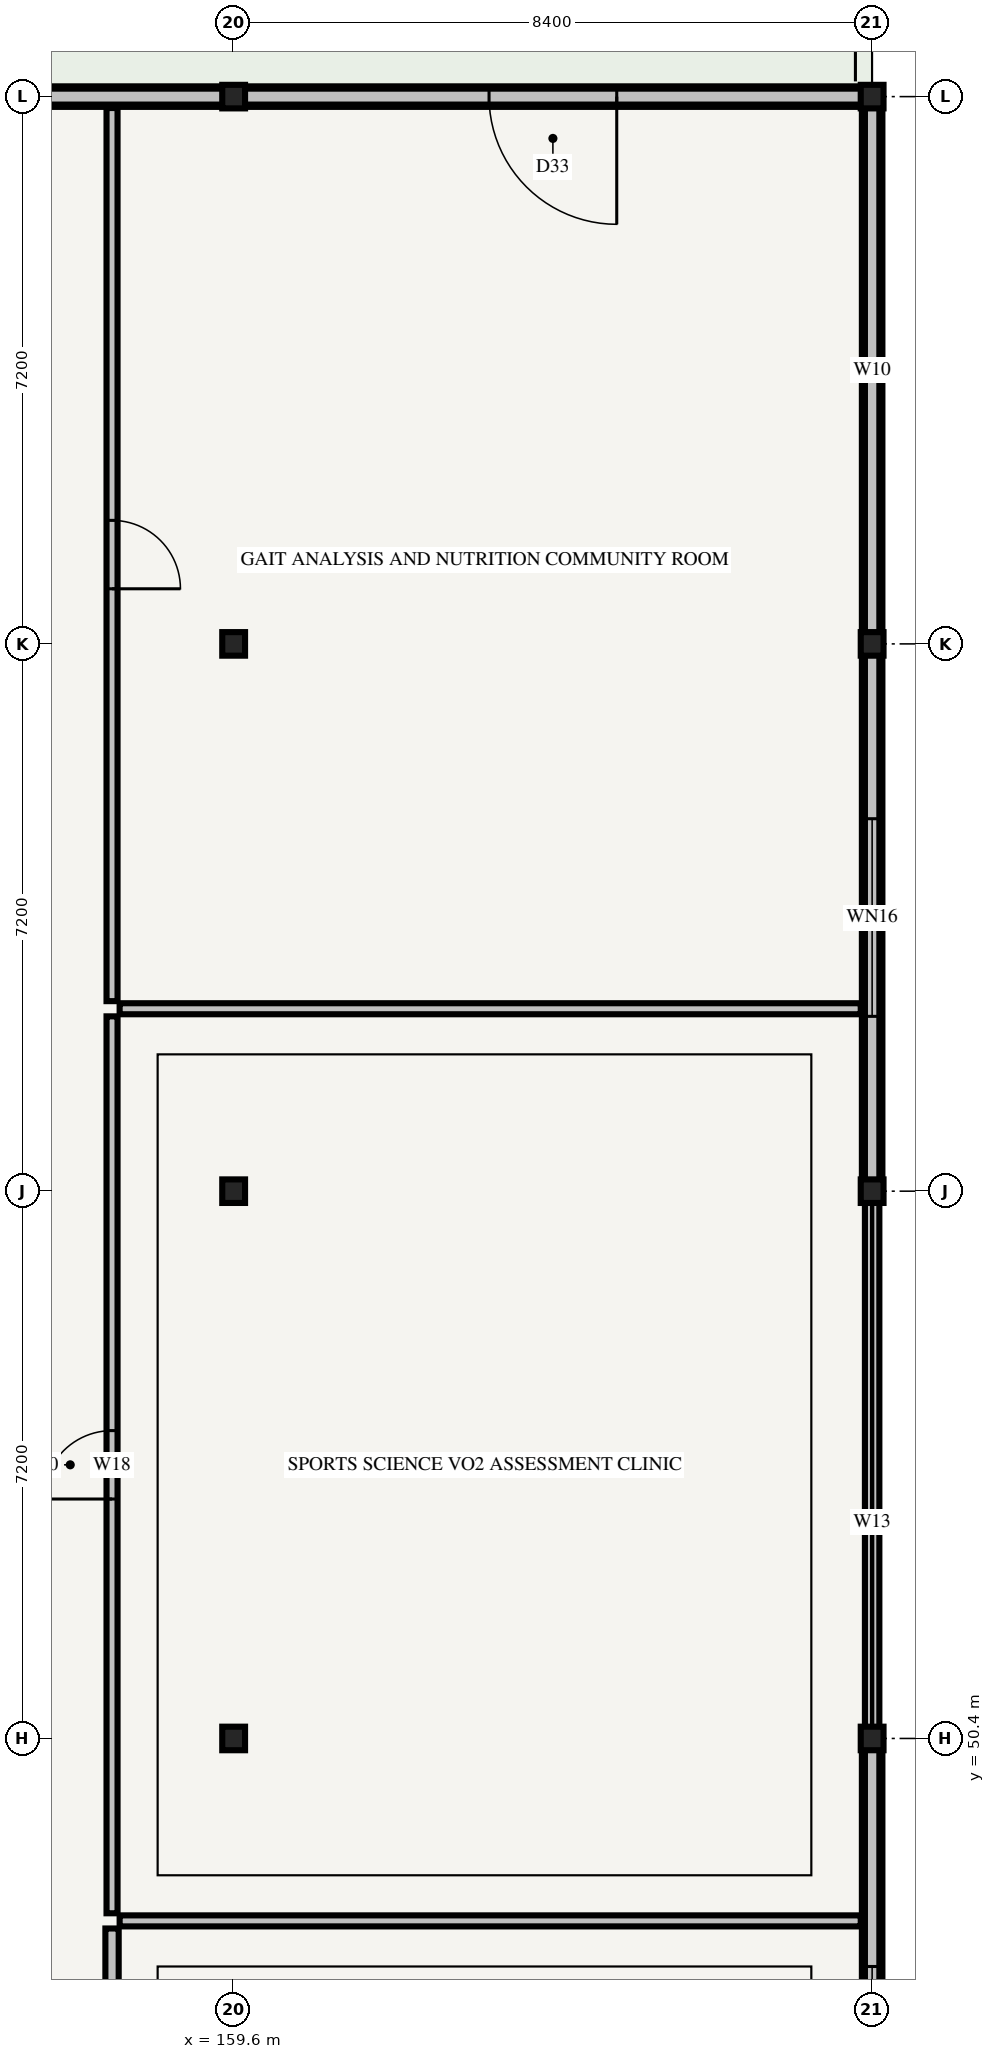
"""IFC4 building model, lengths in metres.
Left out: names, types, materials, properties, quantities, classifications, styles, units other than length and angle.
Written with IfcOpenShell. Run it as: python <this file> out.ifc"""

import sys

from ifc_helpers import new_model, si_unit, direction, frame, frame_2d, origin, origin_2d, place, context, subcontext, project, spatial, rectangle, i_section, extrude, element, fill, save


model = new_model("IFC4")
c1 = context("Model", 3, precision=1e-05, world=origin(), true_north=direction((0.0, 1.0)))
c2 = subcontext(c1, "Body", "Model", "MODEL_VIEW")
j1 = project(units=[si_unit("LENGTHUNIT", "METRE"), si_unit("PLANEANGLEUNIT", "RADIAN")], contexts=[c1])
p1 = place(None, origin())
s1 = spatial("IfcSite", under=j1, at=p1, CompositionType="ELEMENT")
p2 = place(p1, origin())
s2 = spatial("IfcBuilding", under=s1, at=p2, CompositionType="ELEMENT")
p3 = place(p2, frame((0.0, 0.0, 17.1)))
s3 = spatial("IfcBuildingStorey", under=s2, at=p3, CompositionType="ELEMENT", Elevation=17.1)
for number, where, z_axis, x_axis in (
    (1, (159.6, 50.4, 0.0), (0.0, 0.0, 1.0), (1.0, 0.0, 0.0)),
    (2, (159.6, 57.6, 0.0), (0.0, 0.0, 1.0), (1.0, 0.0, 0.0)),
    (3, (159.6, 64.8, 0.0), (0.0, 0.0, 1.0), (1.0, 0.0, 0.0)),
    (4, (159.6, 72.0, 0.0), (0.0, 0.0, 1.0), (1.0, 0.0, 0.0)),
    (5, (168.0, 50.4, 0.0), (0.0, 0.0, 1.0), (1.0, 0.0, 0.0)),
    (6, (168.0, 57.6, 0.0), (0.0, 0.0, 1.0), (1.0, 0.0, 0.0)),
    (7, (168.0, 64.8, 0.0), (0.0, 0.0, 1.0), (1.0, 0.0, 0.0)),
    (8, (168.0, 72.0, 0.0), (0.0, 0.0, 1.0), (1.0, 0.0, 0.0)),
):
    element("IfcColumn", number, at=place(p3, frame(where, z_axis=z_axis, x_axis=x_axis)), inside=s3, PredefinedType="COLUMN", context=c2, shape_type="SweptSolid", body=[
        extrude(i_section(OverallWidth=0.3, OverallDepth=0.31, WebThickness=0.009, FlangeThickness=0.015, FilletRadius=0.027, at=origin_2d()), origin(), (0.0, 0.0, 1.0), 4.2),
    ])
p4 = place(p3, frame((168.0, 43.2, 0.0), z_axis=(0.0, 0.0, 1.0), x_axis=(0.0, 1.0, 0.0)))
e9 = element("IfcWall", 9, at=p4, inside=s3, PredefinedType="STANDARD", context=c2, shape_type="SweptSolid", body=[
    extrude(rectangle(XDim=7.2, YDim=0.27, at=frame_2d((3.6, 0.0))), origin(), (0.0, 0.0, 1.0), 3.495),
])
p5 = place(p4, frame((3.0, 0.0, 0.85)))
e10 = element("IfcOpeningElement", 10, at=p5, cuts=e9, PredefinedType="OPENING", context=c2, shape_type="SweptSolid", body=[
    extrude(rectangle(XDim=1.2, YDim=1.8, at=frame_2d((0.6, 0.9))), frame((0.0, 0.16, 0.0), z_axis=(0.0, -1.0, 0.0), x_axis=(1.0, 0.0, 0.0)), (0.0, 0.0, 1.0), 0.32),
])
p6 = place(p3, frame((168.0, 57.6, 0.0), z_axis=(0.0, 0.0, 1.0), x_axis=(0.0, 1.0, 0.0)))
e11 = element("IfcWall", 11, at=p6, inside=s3, PredefinedType="STANDARD", context=c2, shape_type="SweptSolid", body=[
    extrude(rectangle(XDim=7.2, YDim=0.27, at=frame_2d((3.6, 0.0))), origin(), (0.0, 0.0, 1.0), 3.395),
])
p7 = place(p6, frame((2.3, 0.0, 0.85)))
e12 = element("IfcOpeningElement", 12, at=p7, cuts=e11, PredefinedType="OPENING", context=c2, shape_type="SweptSolid", body=[
    extrude(rectangle(XDim=2.6, YDim=2.0, at=frame_2d((1.3, 1.0))), frame((0.0, 0.16, 0.0), z_axis=(0.0, -1.0, 0.0), x_axis=(1.0, 0.0, 0.0)), (0.0, 0.0, 1.0), 0.32),
])
p8 = place(p3, frame((168.0, 64.8, 0.0), z_axis=(0.0, 0.0, 1.0), x_axis=(0.0, 1.0, 0.0)))
e13 = element("IfcWall", 13, at=p8, inside=s3, PredefinedType="STANDARD", context=c2, shape_type="SweptSolid", body=[
    extrude(rectangle(XDim=7.2, YDim=0.27, at=frame_2d((3.6, 0.0))), origin(), (0.0, 0.0, 1.0), 3.445),
])
p9 = place(p3, frame((168.0, 72.0, 0.0), z_axis=(0.0, 0.0, 1.0), x_axis=(-1.0, 0.0, 0.0)))
e14 = element("IfcWall", 14, at=p9, inside=s3, PredefinedType="STANDARD", context=c2, shape_type="SweptSolid", body=[
    extrude(rectangle(XDim=8.4, YDim=0.27, at=frame_2d((4.2, 0.0))), origin(), (0.0, 0.0, 1.0), 3.545),
])
p10 = place(p9, frame((3.36, 0.0, 0.0)))
e15 = element("IfcOpeningElement", 15, at=p10, cuts=e14, PredefinedType="OPENING", context=c2, shape_type="SweptSolid", body=[
    extrude(rectangle(XDim=1.68, YDim=2.3, at=frame_2d((0.84, 1.15))), frame((0.0, 0.16, 0.0), z_axis=(0.0, -1.0, 0.0), x_axis=(1.0, 0.0, 0.0)), (0.0, 0.0, 1.0), 0.32),
])
p11 = place(p3, frame((159.6, 72.0, 0.0), z_axis=(0.0, 0.0, 1.0), x_axis=(-1.0, 0.0, 0.0)))
e16 = element("IfcWall", 16, at=p11, inside=s3, PredefinedType="STANDARD", context=c2, shape_type="SweptSolid", body=[
    extrude(rectangle(XDim=8.4, YDim=0.27, at=frame_2d((4.2, 0.0))), origin(), (0.0, 0.0, 1.0), 3.495),
])
p12 = place(p11, frame((3.51, 0.0, 0.0)))
e17 = element("IfcOpeningElement", 17, at=p12, cuts=e16, PredefinedType="OPENING", context=c2, shape_type="SweptSolid", body=[
    extrude(rectangle(XDim=1.38, YDim=2.25, at=frame_2d((0.69, 1.125))), frame((0.0, 0.16, 0.0), z_axis=(0.0, -1.0, 0.0), x_axis=(1.0, 0.0, 0.0)), (0.0, 0.0, 1.0), 0.32),
])
p13 = place(p3, frame((168.0, 28.8, 4.2), z_axis=(0.0, 0.0, 1.0), x_axis=(0.0, 1.0, 0.0)))
e18 = element("IfcWall", 18, at=p13, inside=s3, PredefinedType="PARAPET", context=c2, shape_type="SweptSolid", body=[
    extrude(rectangle(XDim=43.2, YDim=0.19, at=frame_2d((21.6, 0.0))), origin(), (0.0, 0.0, 1.0), 0.65),
])
p14 = place(p3, frame((168.0, 72.0, 4.2), z_axis=(0.0, 0.0, 1.0), x_axis=(-1.0, 0.0, 0.0)))
e19 = element("IfcWall", 19, at=p14, inside=s3, PredefinedType="PARAPET", context=c2, shape_type="SweptSolid", body=[
    extrude(rectangle(XDim=25.2, YDim=0.21, at=frame_2d((12.6, 0.0))), origin(), (0.0, 0.0, 1.0), 0.65),
])
p15 = place(p3, frame((158.0, 28.95, 0.0), z_axis=(0.0, 0.0, 1.0), x_axis=(0.0, 1.0, 0.0)))
e20 = element("IfcWall", 20, at=p15, inside=s3, PredefinedType="PARTITIONING", context=c2, shape_type="SweptSolid", body=[
    extrude(rectangle(XDim=18.95, YDim=0.175, at=frame_2d((9.475, 0.0))), origin(), (0.0, 0.0, 1.0), 3.32),
])
p16 = place(p15, frame((8.725, 0.0, 0.0)))
e21 = element("IfcOpeningElement", 21, at=p16, cuts=e20, PredefinedType="OPENING", context=c2, shape_type="SweptSolid", body=[
    extrude(rectangle(XDim=1.5, YDim=2.2, at=frame_2d((0.75, 1.1))), frame((0.0, 0.112, 0.0), z_axis=(0.0, -1.0, 0.0), x_axis=(1.0, 0.0, 0.0)), (0.0, 0.0, 1.0), 0.225),
])
p17 = place(p3, frame((158.0, 48.1, 0.0), z_axis=(0.0, 0.0, 1.0), x_axis=(0.0, 1.0, 0.0)))
e22 = element("IfcWall", 22, at=p17, inside=s3, PredefinedType="PARTITIONING", context=c2, shape_type="SweptSolid", body=[
    extrude(rectangle(XDim=11.8, YDim=0.145, at=frame_2d((5.9, 0.0))), origin(), (0.0, 0.0, 1.0), 3.32),
])
p18 = place(p17, frame((5.45, 0.0, 0.0)))
e23 = element("IfcOpeningElement", 23, at=p18, cuts=e22, PredefinedType="OPENING", context=c2, shape_type="SweptSolid", body=[
    extrude(rectangle(XDim=0.9, YDim=2.1, at=frame_2d((0.45, 1.05))), frame((0.0, 0.097, 0.0), z_axis=(0.0, -1.0, 0.0), x_axis=(1.0, 0.0, 0.0)), (0.0, 0.0, 1.0), 0.195),
])
p19 = place(p3, frame((158.0, 60.1, 0.0), z_axis=(0.0, 0.0, 1.0), x_axis=(0.0, 1.0, 0.0)))
e24 = element("IfcWall", 24, at=p19, inside=s3, PredefinedType="PARTITIONING", context=c2, shape_type="SweptSolid", body=[
    extrude(rectangle(XDim=11.75, YDim=0.145, at=frame_2d((5.875, 0.0))), origin(), (0.0, 0.0, 1.0), 3.32),
])
p20 = place(p19, frame((5.425, 0.0, 0.0)))
e25 = element("IfcOpeningElement", 25, at=p20, cuts=e24, PredefinedType="OPENING", context=c2, shape_type="SweptSolid", body=[
    extrude(rectangle(XDim=0.9, YDim=2.1, at=frame_2d((0.45, 1.05))), frame((0.0, 0.097, 0.0), z_axis=(0.0, -1.0, 0.0), x_axis=(1.0, 0.0, 0.0)), (0.0, 0.0, 1.0), 0.195),
])
for number, where, z_axis, x_axis in (
    (26, (158.1, 48.0, 0.0), (0.0, 0.0, 1.0), (1.0, 0.0, 0.0)),
    (27, (158.1, 60.0, 0.0), (0.0, 0.0, 1.0), (1.0, 0.0, 0.0)),
):
    element("IfcWall", number, at=place(p3, frame(where, z_axis=z_axis, x_axis=x_axis)), inside=s3, PredefinedType="PARTITIONING", context=c2, shape_type="SweptSolid", body=[
        extrude(rectangle(XDim=9.75, YDim=0.145, at=frame_2d((4.875, 0.0))), origin(), (0.0, 0.0, 1.0), 3.32),
    ])
p21 = place(p5, origin())
e28 = element("IfcWindow", 28, at=p21, inside=s3, PartitioningType="SINGLE_PANEL", PredefinedType="WINDOW", context=c2, shape_type="SweptSolid", body=[
    extrude(rectangle(XDim=1.2, YDim=1.8, at=frame_2d((0.6, 0.9))), frame((0.0, 0.03, 0.0), z_axis=(0.0, -1.0, 0.0), x_axis=(1.0, 0.0, 0.0)), (0.0, 0.0, 1.0), 0.06),
])
fill(e10, e28)
p22 = place(p7, origin())
e29 = element("IfcWindow", 29, at=p22, inside=s3, PartitioningType="SINGLE_PANEL", PredefinedType="WINDOW", context=c2, shape_type="SweptSolid", body=[
    extrude(rectangle(XDim=2.6, YDim=2.0, at=frame_2d((1.3, 1.0))), frame((0.0, 0.03, 0.0), z_axis=(0.0, -1.0, 0.0), x_axis=(1.0, 0.0, 0.0)), (0.0, 0.0, 1.0), 0.06),
])
fill(e12, e29)
p23 = place(p10, frame((1.68, 0.0, 0.0), z_axis=(0.0, 0.0, 1.0), x_axis=(-1.0, 0.0, 0.0)))
e30 = element("IfcDoor", 30, at=p23, inside=s3, OperationType="SINGLE_SWING_LEFT", PredefinedType="DOOR", context=c2, shape_type="SweptSolid", body=[
    extrude(rectangle(XDim=1.68, YDim=2.3, at=frame_2d((0.84, 1.15))), frame((0.0, 0.025, 0.0), z_axis=(0.0, -1.0, 0.0), x_axis=(1.0, 0.0, 0.0)), (0.0, 0.0, 1.0), 0.05),
])
fill(e15, e30)
p24 = place(p18, frame((0.9, 0.0, 0.0), z_axis=(0.0, 0.0, 1.0), x_axis=(-1.0, 0.0, 0.0)))
e31 = element("IfcDoor", 31, at=p24, inside=s3, OperationType="SINGLE_SWING_LEFT", PredefinedType="DOOR", context=c2, shape_type="SweptSolid", body=[
    extrude(rectangle(XDim=0.9, YDim=2.1, at=frame_2d((0.45, 1.05))), frame((0.0, 0.025, 0.0), z_axis=(0.0, -1.0, 0.0), x_axis=(1.0, 0.0, 0.0)), (0.0, 0.0, 1.0), 0.05),
])
fill(e23, e31)
p25 = place(p20, origin())
e32 = element("IfcDoor", 32, at=p25, inside=s3, OperationType="SINGLE_SWING_RIGHT", PredefinedType="DOOR", context=c2, shape_type="SweptSolid", body=[
    extrude(rectangle(XDim=0.9, YDim=2.1, at=frame_2d((0.45, 1.05))), frame((0.0, 0.025, 0.0), z_axis=(0.0, -1.0, 0.0), x_axis=(1.0, 0.0, 0.0)), (0.0, 0.0, 1.0), 0.05),
])
fill(e25, e32)
save(model, sys.argv[1])
